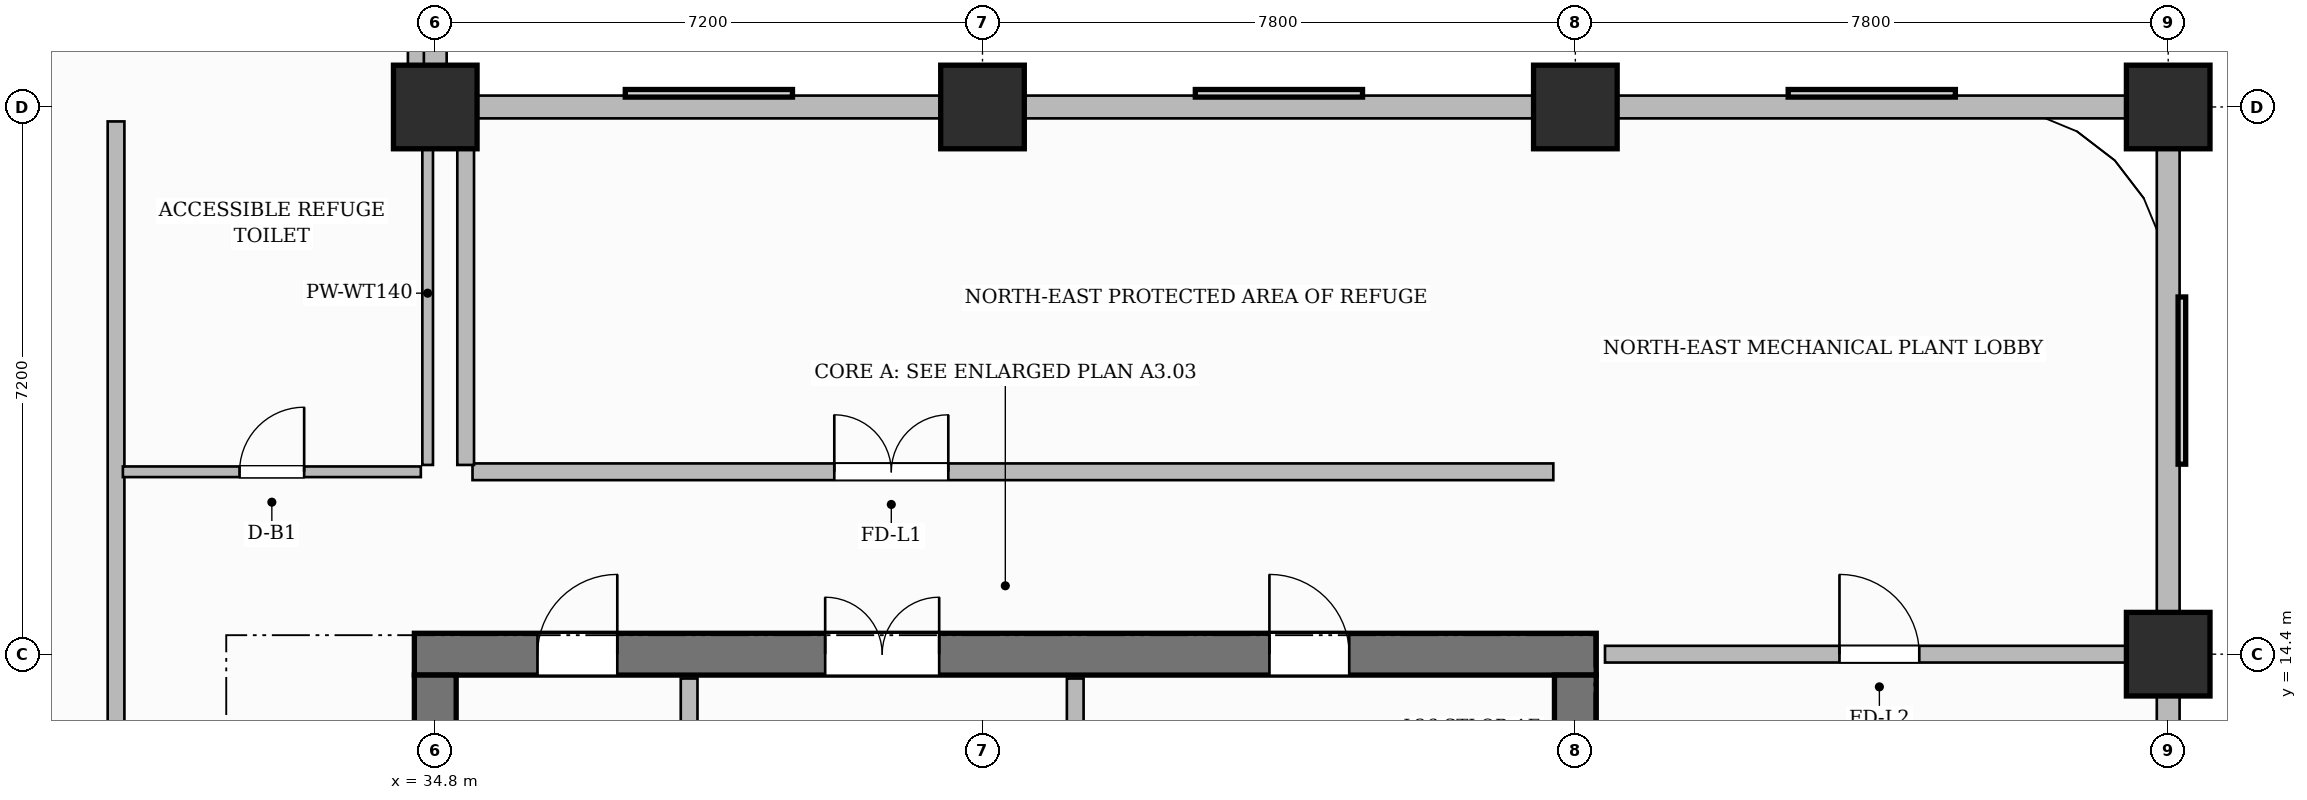
"""IFC4 building model, lengths in metres.
Left out: names, types, materials, properties, quantities, classifications, styles, units other than length and angle.
Written with IfcOpenShell. Run it as: python <this file> out.ifc"""

import sys

from ifc_helpers import new_model, si_unit, direction, frame, frame_2d, origin, origin_2d, place, context, subcontext, project, spatial, rectangle, extrude, source, transform, mapped, element, fill, save


model = new_model("IFC4")
c1 = context("Model", 3, precision=1e-05, world=origin(), true_north=direction((0.0, 1.0)))
c2 = subcontext(c1, "Body", "Model", "MODEL_VIEW")
j1 = project(units=[si_unit("LENGTHUNIT", "METRE"), si_unit("PLANEANGLEUNIT", "RADIAN")], contexts=[c1])
p1 = place(None, origin())
s1 = spatial("IfcSite", under=j1, at=p1, CompositionType="ELEMENT")
p2 = place(p1, origin())
s2 = spatial("IfcBuilding", under=s1, at=p2, CompositionType="ELEMENT")
p3 = place(p2, frame((0.0, 0.0, 106.4)))
s3 = spatial("IfcBuildingStorey", under=s2, at=p3, CompositionType="ELEMENT", Elevation=106.4)
p4 = place(p3, frame((34.525, 14.4, 0.0), z_axis=(0.0, 0.0, 1.0), x_axis=(1.0, 0.0, 0.0)))
e1 = element("IfcWall", 1, at=p4, inside=s3, PredefinedType="SHEAR", context=c2, shape_type="SweptSolid", body=[
    extrude(rectangle(XDim=15.55, YDim=0.55, at=frame_2d((7.775, 0.0))), origin(), (0.0, 0.0, 1.0), 5.4),
])
p5 = place(p4, frame((5.405, 0.0, 0.0)))
e2 = element("IfcOpeningElement", 2, at=p5, cuts=e1, PredefinedType="OPENING", context=c2, shape_type="SweptSolid", body=[
    extrude(rectangle(XDim=1.5, YDim=2.2, at=frame_2d((0.75, 1.1))), frame((0.0, 0.285, 0.0), z_axis=(0.0, -1.0, 0.0), x_axis=(1.0, 0.0, 0.0)), (0.0, 0.0, 1.0), 0.57),
])
p6 = place(p4, frame((1.62, 0.0, 0.0)))
e3 = element("IfcOpeningElement", 3, at=p6, cuts=e1, PredefinedType="OPENING", context=c2, shape_type="SweptSolid", body=[
    extrude(rectangle(XDim=1.05, YDim=2.15, at=frame_2d((0.525, 1.075))), frame((0.0, 0.285, 0.0), z_axis=(0.0, -1.0, 0.0), x_axis=(1.0, 0.0, 0.0)), (0.0, 0.0, 1.0), 0.57),
])
p7 = place(p4, frame((11.25, 0.0, 0.0)))
e4 = element("IfcOpeningElement", 4, at=p7, cuts=e1, PredefinedType="OPENING", context=c2, shape_type="SweptSolid", body=[
    extrude(rectangle(XDim=1.05, YDim=2.15, at=frame_2d((0.525, 1.075))), frame((0.0, 0.285, 0.0), z_axis=(0.0, -1.0, 0.0), x_axis=(1.0, 0.0, 0.0)), (0.0, 0.0, 1.0), 0.57),
])
for number, where, z_axis, x_axis in (
    (5, (34.8, 3.875, 0.0), (0.0, 0.0, 1.0), (0.0, 1.0, 0.0)),
    (6, (49.8, 3.875, 0.0), (0.0, 0.0, 1.0), (0.0, 1.0, 0.0)),
):
    element("IfcWall", number, at=place(p3, frame(where, z_axis=z_axis, x_axis=x_axis)), inside=s3, PredefinedType="SHEAR", context=c2, shape_type="SweptSolid", body=[
        extrude(rectangle(XDim=10.25, YDim=0.55, at=frame_2d((5.125, 0.0))), origin(), (0.0, 0.0, 1.0), 5.4),
    ])
m1 = source(origin(), c2, "Body", "SweptSolid", [
    extrude(rectangle(XDim=1.1, YDim=1.1, at=origin_2d()), origin(), (0.0, 0.0, 1.0), 5.4),
])
for number, where, z_axis, x_axis in (
    (7, (34.8, 21.6, 0.0), (0.0, 0.0, 1.0), (1.0, 0.0, 0.0)),
    (8, (42.0, 21.6, 0.0), (0.0, 0.0, 1.0), (1.0, 0.0, 0.0)),
    (9, (49.8, 21.6, 0.0), (0.0, 0.0, 1.0), (1.0, 0.0, 0.0)),
    (10, (57.6, 14.4, 0.0), (0.0, 0.0, 1.0), (1.0, 0.0, 0.0)),
    (11, (57.6, 21.6, 0.0), (0.0, 0.0, 1.0), (1.0, 0.0, 0.0)),
):
    element("IfcColumn", number, at=place(p3, frame(where, z_axis=z_axis, x_axis=x_axis)), inside=s3, PredefinedType="COLUMN", context=c2, shape_type="MappedRepresentation", body=[
        mapped(m1, transform((0.0, 0.0, 0.0), scale=1.0)),
    ])
p8 = place(p3, frame((38.14, 11.22, 0.0), z_axis=(0.0, 0.0, 1.0), x_axis=(0.0, 1.0, 0.0)))
e12 = element("IfcWall", 12, at=p8, inside=s3, PredefinedType="PARTITIONING", context=c2, shape_type="SweptSolid", body=[
    extrude(rectangle(XDim=2.86, YDim=0.22, at=frame_2d((1.43, 0.0))), origin(), (0.0, 0.0, 1.0), 5.15),
])
p9 = place(p8, frame((0.905, 0.0, 0.0)))
e13 = element("IfcOpeningElement", 13, at=p9, cuts=e12, PredefinedType="OPENING", context=c2, shape_type="SweptSolid", body=[
    extrude(rectangle(XDim=1.05, YDim=2.15, at=frame_2d((0.525, 1.075))), frame((0.0, 0.12, 0.0), z_axis=(0.0, -1.0, 0.0), x_axis=(1.0, 0.0, 0.0)), (0.0, 0.0, 1.0), 0.24),
])
p10 = place(p3, frame((43.22, 11.22, 0.0), z_axis=(0.0, 0.0, 1.0), x_axis=(0.0, 1.0, 0.0)))
e14 = element("IfcWall", 14, at=p10, inside=s3, PredefinedType="PARTITIONING", context=c2, shape_type="SweptSolid", body=[
    extrude(rectangle(XDim=2.86, YDim=0.22, at=frame_2d((1.43, 0.0))), origin(), (0.0, 0.0, 1.0), 5.15),
])
p11 = place(p10, frame((0.905, 0.0, 0.0)))
e15 = element("IfcOpeningElement", 15, at=p11, cuts=e14, PredefinedType="OPENING", context=c2, shape_type="SweptSolid", body=[
    extrude(rectangle(XDim=1.05, YDim=2.15, at=frame_2d((0.525, 1.075))), frame((0.0, 0.12, 0.0), z_axis=(0.0, -1.0, 0.0), x_axis=(1.0, 0.0, 0.0)), (0.0, 0.0, 1.0), 0.24),
])
p12 = place(p3, frame((30.6, 12.19, 0.0), z_axis=(0.0, 0.0, 1.0), x_axis=(0.0, 1.0, 0.0)))
e16 = element("IfcWall", 16, at=p12, inside=s3, PredefinedType="PARTITIONING", context=c2, shape_type="SweptSolid", body=[
    extrude(rectangle(XDim=9.22, YDim=0.22, at=frame_2d((4.61, 0.0))), origin(), (0.0, 0.0, 1.0), 5.15),
])
p13 = place(p3, frame((30.69, 16.8, 0.0), z_axis=(0.0, 0.0, 1.0), x_axis=(1.0, 0.0, 0.0)))
e17 = element("IfcWall", 17, at=p13, inside=s3, PredefinedType="PARTITIONING", context=c2, shape_type="SweptSolid", body=[
    extrude(rectangle(XDim=3.92, YDim=0.14, at=frame_2d((1.96, 0.0))), origin(), (0.0, 0.0, 1.0), 5.15),
])
p14 = place(p13, frame((1.535, 0.0, 0.0)))
e18 = element("IfcOpeningElement", 18, at=p14, cuts=e17, PredefinedType="OPENING", context=c2, shape_type="SweptSolid", body=[
    extrude(rectangle(XDim=0.85, YDim=2.1, at=frame_2d((0.425, 1.05))), frame((0.0, 0.08, 0.0), z_axis=(0.0, -1.0, 0.0), x_axis=(1.0, 0.0, 0.0)), (0.0, 0.0, 1.0), 0.16),
])
p15 = place(p3, frame((34.7, 16.89, 0.0), z_axis=(0.0, 0.0, 1.0), x_axis=(0.0, 1.0, 0.0)))
e19 = element("IfcWall", 19, at=p15, inside=s3, PredefinedType="PARTITIONING", context=c2, shape_type="SweptSolid", body=[
    extrude(rectangle(XDim=4.52, YDim=0.14, at=frame_2d((2.26, 0.0))), origin(), (0.0, 0.0, 1.0), 4.485),
])
p16 = place(p3, frame((50.19, 14.4, 0.0), z_axis=(0.0, 0.0, 1.0), x_axis=(1.0, 0.0, 0.0)))
e20 = element("IfcWall", 20, at=p16, inside=s3, PredefinedType="PARTITIONING", context=c2, shape_type="SweptSolid", body=[
    extrude(rectangle(XDim=7.22, YDim=0.22, at=frame_2d((3.61, 0.0))), origin(), (0.0, 0.0, 1.0), 5.15),
])
p17 = place(p16, frame((3.085, 0.0, 0.0)))
e21 = element("IfcOpeningElement", 21, at=p17, cuts=e20, PredefinedType="OPENING", context=c2, shape_type="SweptSolid", body=[
    extrude(rectangle(XDim=1.05, YDim=2.15, at=frame_2d((0.525, 1.075))), frame((0.0, 0.12, 0.0), z_axis=(0.0, -1.0, 0.0), x_axis=(1.0, 0.0, 0.0)), (0.0, 0.0, 1.0), 0.24),
])
p18 = place(p3, frame((35.29, 16.8, 0.0), z_axis=(0.0, 0.0, 1.0), x_axis=(1.0, 0.0, 0.0)))
e22 = element("IfcWall", 22, at=p18, inside=s3, PredefinedType="PARTITIONING", context=c2, shape_type="SweptSolid", body=[
    extrude(rectangle(XDim=14.22, YDim=0.22, at=frame_2d((7.11, 0.0))), origin(), (0.0, 0.0, 1.0), 5.15),
])
p19 = place(p18, frame((4.76, 0.0, 0.0)))
e23 = element("IfcOpeningElement", 23, at=p19, cuts=e22, PredefinedType="OPENING", context=c2, shape_type="SweptSolid", body=[
    extrude(rectangle(XDim=1.5, YDim=2.2, at=frame_2d((0.75, 1.1))), frame((0.0, 0.12, 0.0), z_axis=(0.0, -1.0, 0.0), x_axis=(1.0, 0.0, 0.0)), (0.0, 0.0, 1.0), 0.24),
])
p20 = place(p3, frame((35.2, 16.89, 0.0), z_axis=(0.0, 0.0, 1.0), x_axis=(0.0, 1.0, 0.0)))
e24 = element("IfcWall", 24, at=p20, inside=s3, PredefinedType="PARTITIONING", context=c2, shape_type="SweptSolid", body=[
    extrude(rectangle(XDim=4.52, YDim=0.22, at=frame_2d((2.26, 0.0))), origin(), (0.0, 0.0, 1.0), 5.15),
])
p21 = place(p3, frame((34.55, 21.69, 0.0), z_axis=(0.0, 0.0, 1.0), x_axis=(0.0, 1.0, 0.0)))
e25 = element("IfcWall", 25, at=p21, inside=s3, PredefinedType="PARTITIONING", context=c2, shape_type="SweptSolid", body=[
    extrude(rectangle(XDim=10.47, YDim=0.22, at=frame_2d((5.235, 0.0))), origin(), (0.0, 0.0, 1.0), 4.485),
])
p22 = place(p3, frame((57.6, 0.05, 0.0), z_axis=(0.0, 0.0, 1.0), x_axis=(0.0, 1.0, 0.0)))
e26 = element("IfcWall", 26, at=p22, inside=s3, PredefinedType="SOLIDWALL", context=c2, shape_type="SweptSolid", body=[
    extrude(rectangle(XDim=21.5, YDim=0.3, at=frame_2d((10.75, 0.0))), origin(), (0.0, 0.0, 1.0), 5.15),
])
p23 = place(p3, frame((34.8, 21.6, 0.0), z_axis=(0.0, 0.0, 1.0), x_axis=(1.0, 0.0, 0.0)))
e27 = element("IfcWall", 27, at=p23, inside=s3, PredefinedType="SOLIDWALL", context=c2, shape_type="SweptSolid", body=[
    extrude(rectangle(XDim=22.8, YDim=0.3, at=frame_2d((11.4, 0.0))), origin(), (0.0, 0.0, 1.0), 4.485),
])
p24 = place(p3, frame((34.8, 21.65, 0.0), z_axis=(0.0, 0.0, 1.0), x_axis=(0.0, 1.0, 0.0)))
e28 = element("IfcWall", 28, at=p24, inside=s3, PredefinedType="SOLIDWALL", context=c2, shape_type="SweptSolid", body=[
    extrude(rectangle(XDim=10.75, YDim=0.3, at=frame_2d((5.375, 0.0))), origin(), (0.0, 0.0, 1.0), 4.485),
])
m2 = source(origin(), c2, "Body", "SweptSolid", [
    extrude(rectangle(XDim=1.5, YDim=2.2, at=frame_2d((0.75, 1.1))), frame((0.0, 0.025, 0.0), z_axis=(0.0, -1.0, 0.0), x_axis=(1.0, 0.0, 0.0)), (0.0, 0.0, 1.0), 0.05),
])
p25 = place(p5, origin())
e29 = element("IfcDoor", 29, at=p25, inside=s3, OperationType="DOUBLE_DOOR_SINGLE_SWING", PredefinedType="DOOR", context=c2, shape_type="MappedRepresentation", body=[
    mapped(m2, transform((0.0, 0.0, 0.0), scale=1.0)),
])
fill(e2, e29)
m3 = source(origin(), c2, "Body", "SweptSolid", [
    extrude(rectangle(XDim=1.05, YDim=2.15, at=frame_2d((0.525, 1.075))), frame((0.0, 0.025, 0.0), z_axis=(0.0, -1.0, 0.0), x_axis=(1.0, 0.0, 0.0)), (0.0, 0.0, 1.0), 0.05),
])
p26 = place(p6, origin())
e30 = element("IfcDoor", 30, at=p26, inside=s3, OperationType="SINGLE_SWING_RIGHT", PredefinedType="DOOR", context=c2, shape_type="MappedRepresentation", body=[
    mapped(m3, transform((0.0, 0.0, 0.0), scale=1.0)),
])
fill(e3, e30)
p27 = place(p7, origin())
e31 = element("IfcDoor", 31, at=p27, inside=s3, OperationType="SINGLE_SWING_LEFT", PredefinedType="DOOR", context=c2, shape_type="MappedRepresentation", body=[
    mapped(m3, transform((0.0, 0.0, 0.0), scale=1.0)),
])
fill(e4, e31)
m4 = source(origin(), c2, "Body", "SweptSolid", [
    extrude(rectangle(XDim=0.85, YDim=2.1, at=frame_2d((0.425, 1.05))), frame((0.0, 0.025, 0.0), z_axis=(0.0, -1.0, 0.0), x_axis=(1.0, 0.0, 0.0)), (0.0, 0.0, 1.0), 0.05),
])
p28 = place(p14, origin())
e32 = element("IfcDoor", 32, at=p28, inside=s3, OperationType="SINGLE_SWING_RIGHT", PredefinedType="DOOR", context=c2, shape_type="MappedRepresentation", body=[
    mapped(m4, transform((0.0, 0.0, 0.0), scale=1.0)),
])
fill(e18, e32)
p29 = place(p17, origin())
e33 = element("IfcDoor", 33, at=p29, inside=s3, OperationType="SINGLE_SWING_LEFT", PredefinedType="DOOR", context=c2, shape_type="MappedRepresentation", body=[
    mapped(m3, transform((0.0, 0.0, 0.0), scale=1.0)),
])
fill(e21, e33)
p30 = place(p19, origin())
e34 = element("IfcDoor", 34, at=p30, inside=s3, OperationType="DOUBLE_DOOR_SINGLE_SWING", PredefinedType="DOOR", context=c2, shape_type="MappedRepresentation", body=[
    mapped(m2, transform((0.0, 0.0, 0.0), scale=1.0)),
])
fill(e23, e34)
save(model, sys.argv[1])
